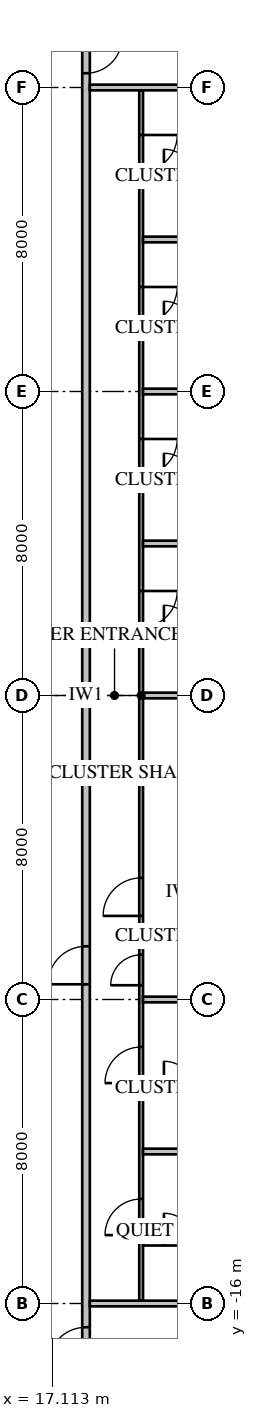
"""IFC4 building model, lengths in metres.
Left out: names, types, materials, properties, quantities, classifications, styles, units other than length and angle.
Written with IfcOpenShell. Run it as: python <this file> out.ifc"""

import sys

from ifc_helpers import new_model, si_unit, direction, frame, frame_2d, origin, place, context, subcontext, project, spatial, rectangle, extrude, element, fill, save


model = new_model("IFC4")
c1 = context("Model", 3, precision=1e-05, world=origin(), true_north=direction((0.0, 1.0)))
c2 = subcontext(c1, "Body", "Model", "MODEL_VIEW")
j1 = project(units=[si_unit("LENGTHUNIT", "METRE"), si_unit("PLANEANGLEUNIT", "RADIAN")], contexts=[c1])
p1 = place(None, origin())
s1 = spatial("IfcSite", under=j1, at=p1, CompositionType="ELEMENT")
p2 = place(p1, origin())
s2 = spatial("IfcBuilding", under=s1, at=p2, CompositionType="ELEMENT")
p3 = place(p2, frame((0.0, 0.0, 23.7)))
s3 = spatial("IfcBuildingStorey", under=s2, at=p3, CompositionType="ELEMENT", Elevation=23.7)
p4 = place(p3, frame((18.0, -18.0, 0.0), z_axis=(0.0, 0.0, 1.0), x_axis=(0.0, 1.0, 0.0)))
e1 = element("IfcWall", 1, at=p4, inside=s3, PredefinedType="PARTITIONING", context=c2, shape_type="SweptSolid", body=[
    extrude(rectangle(XDim=36.0, YDim=0.2, at=frame_2d((18.0, 0.0))), origin(), (0.0, 0.0, 1.0), 3.65),
])
p5 = place(p4, frame((10.4, 0.0, 0.0)))
e2 = element("IfcOpeningElement", 2, at=p5, cuts=e1, PredefinedType="OPENING", context=c2, shape_type="SweptSolid", body=[
    extrude(rectangle(XDim=1.0, YDim=2.1, at=frame_2d((0.5, 1.05))), frame((0.0, 0.12, 0.0), z_axis=(0.0, -1.0, 0.0), x_axis=(1.0, 0.0, 0.0)), (0.0, 0.0, 1.0), 0.24),
])
p6 = place(p4, frame((0.375, 0.0, 0.0)))
e3 = element("IfcOpeningElement", 3, at=p6, cuts=e1, PredefinedType="OPENING", context=c2, shape_type="SweptSolid", body=[
    extrude(rectangle(XDim=1.0, YDim=2.1, at=frame_2d((0.5, 1.05))), frame((0.0, 0.12, 0.0), z_axis=(0.0, -1.0, 0.0), x_axis=(1.0, 0.0, 0.0)), (0.0, 0.0, 1.0), 0.24),
])
p7 = place(p4, frame((34.375, 0.0, 0.0)))
e4 = element("IfcOpeningElement", 4, at=p7, cuts=e1, PredefinedType="OPENING", context=c2, shape_type="SweptSolid", body=[
    extrude(rectangle(XDim=0.95, YDim=2.1, at=frame_2d((0.475, 1.05))), frame((0.0, 0.12, 0.0), z_axis=(0.0, -1.0, 0.0), x_axis=(1.0, 0.0, 0.0)), (0.0, 0.0, 1.0), 0.24),
])
p8 = place(p3, frame((19.45, -15.925, 0.0), z_axis=(0.0, 0.0, 1.0), x_axis=(0.0, 1.0, 0.0)))
e5 = element("IfcWall", 5, at=p8, inside=s3, PredefinedType="PARTITIONING", context=c2, shape_type="SweptSolid", body=[
    extrude(rectangle(XDim=31.85, YDim=0.1, at=frame_2d((15.925, 0.0))), origin(), (0.0, 0.0, 1.0), 3.65),
])
p9 = place(p8, frame((10.125, 0.0, 0.0)))
e6 = element("IfcOpeningElement", 6, at=p9, cuts=e5, PredefinedType="OPENING", context=c2, shape_type="SweptSolid", body=[
    extrude(rectangle(XDim=1.0, YDim=2.1, at=frame_2d((0.5, 1.05))), frame((0.0, 0.07, 0.0), z_axis=(0.0, -1.0, 0.0), x_axis=(1.0, 0.0, 0.0)), (0.0, 0.0, 1.0), 0.14),
])
p10 = place(p8, frame((8.3, 0.0, 0.0)))
e7 = element("IfcOpeningElement", 7, at=p10, cuts=e5, PredefinedType="OPENING", context=c2, shape_type="SweptSolid", body=[
    extrude(rectangle(XDim=0.8, YDim=2.1, at=frame_2d((0.4, 1.05))), frame((0.0, 0.07, 0.0), z_axis=(0.0, -1.0, 0.0), x_axis=(1.0, 0.0, 0.0)), (0.0, 0.0, 1.0), 0.14),
])
p11 = place(p8, frame((1.725, 0.0, 0.0)))
e8 = element("IfcOpeningElement", 8, at=p11, cuts=e5, PredefinedType="OPENING", context=c2, shape_type="SweptSolid", body=[
    extrude(rectangle(XDim=0.95, YDim=2.1, at=frame_2d((0.475, 1.05))), frame((0.0, 0.07, 0.0), z_axis=(0.0, -1.0, 0.0), x_axis=(1.0, 0.0, 0.0)), (0.0, 0.0, 1.0), 0.14),
])
p12 = place(p8, frame((5.725, 0.0, 0.0)))
e9 = element("IfcOpeningElement", 9, at=p12, cuts=e5, PredefinedType="OPENING", context=c2, shape_type="SweptSolid", body=[
    extrude(rectangle(XDim=0.95, YDim=2.1, at=frame_2d((0.475, 1.05))), frame((0.0, 0.07, 0.0), z_axis=(0.0, -1.0, 0.0), x_axis=(1.0, 0.0, 0.0)), (0.0, 0.0, 1.0), 0.14),
])
p13 = place(p8, frame((17.725, 0.0, 0.0)))
e10 = element("IfcOpeningElement", 10, at=p13, cuts=e5, PredefinedType="OPENING", context=c2, shape_type="SweptSolid", body=[
    extrude(rectangle(XDim=0.95, YDim=2.1, at=frame_2d((0.475, 1.05))), frame((0.0, 0.07, 0.0), z_axis=(0.0, -1.0, 0.0), x_axis=(1.0, 0.0, 0.0)), (0.0, 0.0, 1.0), 0.14),
])
p14 = place(p8, frame((21.725, 0.0, 0.0)))
e11 = element("IfcOpeningElement", 11, at=p14, cuts=e5, PredefinedType="OPENING", context=c2, shape_type="SweptSolid", body=[
    extrude(rectangle(XDim=0.95, YDim=2.1, at=frame_2d((0.475, 1.05))), frame((0.0, 0.07, 0.0), z_axis=(0.0, -1.0, 0.0), x_axis=(1.0, 0.0, 0.0)), (0.0, 0.0, 1.0), 0.14),
])
p15 = place(p8, frame((25.725, 0.0, 0.0)))
e12 = element("IfcOpeningElement", 12, at=p15, cuts=e5, PredefinedType="OPENING", context=c2, shape_type="SweptSolid", body=[
    extrude(rectangle(XDim=0.95, YDim=2.1, at=frame_2d((0.475, 1.05))), frame((0.0, 0.07, 0.0), z_axis=(0.0, -1.0, 0.0), x_axis=(1.0, 0.0, 0.0)), (0.0, 0.0, 1.0), 0.14),
])
p16 = place(p8, frame((29.725, 0.0, 0.0)))
e13 = element("IfcOpeningElement", 13, at=p16, cuts=e5, PredefinedType="OPENING", context=c2, shape_type="SweptSolid", body=[
    extrude(rectangle(XDim=0.95, YDim=2.1, at=frame_2d((0.475, 1.05))), frame((0.0, 0.07, 0.0), z_axis=(0.0, -1.0, 0.0), x_axis=(1.0, 0.0, 0.0)), (0.0, 0.0, 1.0), 0.14),
])
p17 = place(p3, frame((19.5, -6.275, 0.0), z_axis=(0.0, 0.0, 1.0), x_axis=(1.0, 0.0, 0.0)))
e14 = element("IfcWall", 14, at=p17, inside=s3, PredefinedType="PARTITIONING", context=c2, shape_type="SweptSolid", body=[
    extrude(rectangle(XDim=2.1, YDim=0.1, at=frame_2d((1.05, 0.0))), origin(), (0.0, 0.0, 1.0), 3.65),
])
p18 = place(p3, frame((18.1, -16.0, 0.0), z_axis=(0.0, 0.0, 1.0), x_axis=(1.0, 0.0, 0.0)))
e15 = element("IfcWall", 15, at=p18, inside=s3, PredefinedType="PARTITIONING", context=c2, shape_type="SweptSolid", body=[
    extrude(rectangle(XDim=6.589, YDim=0.15, at=frame_2d((3.295, 0.0))), origin(), (0.0, 0.0, 1.0), 3.65),
])
for number, where, z_axis, x_axis in (
    (16, (19.5, -12.0, 0.0), (0.0, 0.0, 1.0), (1.0, 0.0, 0.0)),
    (17, (19.5, -8.0, 0.0), (0.0, 0.0, 1.0), (1.0, 0.0, 0.0)),
):
    element("IfcWall", number, at=place(p3, frame(where, z_axis=z_axis, x_axis=x_axis)), inside=s3, PredefinedType="PARTITIONING", context=c2, shape_type="SweptSolid", body=[
        extrude(rectangle(XDim=5.2, YDim=0.15, at=frame_2d((2.6, 0.0))), origin(), (0.0, 0.0, 1.0), 3.65),
    ])
p19 = place(p3, frame((19.5, 0.0, 0.0), z_axis=(0.0, 0.0, 1.0), x_axis=(1.0, 0.0, 0.0)))
e18 = element("IfcWall", 18, at=p19, inside=s3, PredefinedType="PARTITIONING", context=c2, shape_type="SweptSolid", body=[
    extrude(rectangle(XDim=5.2, YDim=0.15, at=frame_2d((2.6, 0.0))), origin(), (0.0, 0.0, 1.0), 2.957),
])
for number, where, z_axis, x_axis in (
    (19, (19.5, 4.0, 0.0), (0.0, 0.0, 1.0), (1.0, 0.0, 0.0)),
    (20, (19.5, 8.0, 0.0), (0.0, 0.0, 1.0), (1.0, 0.0, 0.0)),
    (21, (19.5, 12.0, 0.0), (0.0, 0.0, 1.0), (1.0, 0.0, 0.0)),
):
    element("IfcWall", number, at=place(p3, frame(where, z_axis=z_axis, x_axis=x_axis)), inside=s3, PredefinedType="PARTITIONING", context=c2, shape_type="SweptSolid", body=[
        extrude(rectangle(XDim=5.2, YDim=0.15, at=frame_2d((2.6, 0.0))), origin(), (0.0, 0.0, 1.0), 3.65),
    ])
p20 = place(p3, frame((18.1, 16.0, 0.0), z_axis=(0.0, 0.0, 1.0), x_axis=(1.0, 0.0, 0.0)))
e22 = element("IfcWall", 22, at=p20, inside=s3, PredefinedType="PARTITIONING", context=c2, shape_type="SweptSolid", body=[
    extrude(rectangle(XDim=6.589, YDim=0.15, at=frame_2d((3.295, 0.0))), origin(), (0.0, 0.0, 1.0), 3.65),
])
p21 = place(p3, frame((19.5, -14.425, 0.0), z_axis=(0.0, 0.0, 1.0), x_axis=(1.0, 0.0, 0.0)))
e23 = element("IfcWall", 23, at=p21, inside=s3, PredefinedType="PARTITIONING", context=c2, shape_type="SweptSolid", body=[
    extrude(rectangle(XDim=2.7, YDim=0.1, at=frame_2d((1.35, 0.0))), origin(), (0.0, 0.0, 1.0), 3.65),
])
p22 = place(p21, frame((0.55, 0.0, 0.0)))
e24 = element("IfcOpeningElement", 24, at=p22, cuts=e23, PredefinedType="OPENING", context=c2, shape_type="SweptSolid", body=[
    extrude(rectangle(XDim=0.8, YDim=2.1, at=frame_2d((0.4, 1.05))), frame((0.0, 0.07, 0.0), z_axis=(0.0, -1.0, 0.0), x_axis=(1.0, 0.0, 0.0)), (0.0, 0.0, 1.0), 0.14),
])
p23 = place(p3, frame((19.5, -10.425, 0.0), z_axis=(0.0, 0.0, 1.0), x_axis=(1.0, 0.0, 0.0)))
e25 = element("IfcWall", 25, at=p23, inside=s3, PredefinedType="PARTITIONING", context=c2, shape_type="SweptSolid", body=[
    extrude(rectangle(XDim=2.7, YDim=0.1, at=frame_2d((1.35, 0.0))), origin(), (0.0, 0.0, 1.0), 3.65),
])
p24 = place(p23, frame((0.55, 0.0, 0.0)))
e26 = element("IfcOpeningElement", 26, at=p24, cuts=e25, PredefinedType="OPENING", context=c2, shape_type="SweptSolid", body=[
    extrude(rectangle(XDim=0.8, YDim=2.1, at=frame_2d((0.4, 1.05))), frame((0.0, 0.07, 0.0), z_axis=(0.0, -1.0, 0.0), x_axis=(1.0, 0.0, 0.0)), (0.0, 0.0, 1.0), 0.14),
])
p25 = place(p3, frame((19.5, 1.575, 0.0), z_axis=(0.0, 0.0, 1.0), x_axis=(1.0, 0.0, 0.0)))
e27 = element("IfcWall", 27, at=p25, inside=s3, PredefinedType="PARTITIONING", context=c2, shape_type="SweptSolid", body=[
    extrude(rectangle(XDim=2.7, YDim=0.1, at=frame_2d((1.35, 0.0))), origin(), (0.0, 0.0, 1.0), 3.65),
])
p26 = place(p25, frame((0.55, 0.0, 0.0)))
e28 = element("IfcOpeningElement", 28, at=p26, cuts=e27, PredefinedType="OPENING", context=c2, shape_type="SweptSolid", body=[
    extrude(rectangle(XDim=0.8, YDim=2.1, at=frame_2d((0.4, 1.05))), frame((0.0, 0.07, 0.0), z_axis=(0.0, -1.0, 0.0), x_axis=(1.0, 0.0, 0.0)), (0.0, 0.0, 1.0), 0.14),
])
p27 = place(p3, frame((19.5, 5.575, 0.0), z_axis=(0.0, 0.0, 1.0), x_axis=(1.0, 0.0, 0.0)))
e29 = element("IfcWall", 29, at=p27, inside=s3, PredefinedType="PARTITIONING", context=c2, shape_type="SweptSolid", body=[
    extrude(rectangle(XDim=2.7, YDim=0.1, at=frame_2d((1.35, 0.0))), origin(), (0.0, 0.0, 1.0), 3.65),
])
p28 = place(p27, frame((0.55, 0.0, 0.0)))
e30 = element("IfcOpeningElement", 30, at=p28, cuts=e29, PredefinedType="OPENING", context=c2, shape_type="SweptSolid", body=[
    extrude(rectangle(XDim=0.8, YDim=2.1, at=frame_2d((0.4, 1.05))), frame((0.0, 0.07, 0.0), z_axis=(0.0, -1.0, 0.0), x_axis=(1.0, 0.0, 0.0)), (0.0, 0.0, 1.0), 0.14),
])
p29 = place(p3, frame((19.5, 9.575, 0.0), z_axis=(0.0, 0.0, 1.0), x_axis=(1.0, 0.0, 0.0)))
e31 = element("IfcWall", 31, at=p29, inside=s3, PredefinedType="PARTITIONING", context=c2, shape_type="SweptSolid", body=[
    extrude(rectangle(XDim=2.7, YDim=0.1, at=frame_2d((1.35, 0.0))), origin(), (0.0, 0.0, 1.0), 3.65),
])
p30 = place(p29, frame((0.55, 0.0, 0.0)))
e32 = element("IfcOpeningElement", 32, at=p30, cuts=e31, PredefinedType="OPENING", context=c2, shape_type="SweptSolid", body=[
    extrude(rectangle(XDim=0.8, YDim=2.1, at=frame_2d((0.4, 1.05))), frame((0.0, 0.07, 0.0), z_axis=(0.0, -1.0, 0.0), x_axis=(1.0, 0.0, 0.0)), (0.0, 0.0, 1.0), 0.14),
])
p31 = place(p3, frame((19.5, 13.575, 0.0), z_axis=(0.0, 0.0, 1.0), x_axis=(1.0, 0.0, 0.0)))
e33 = element("IfcWall", 33, at=p31, inside=s3, PredefinedType="PARTITIONING", context=c2, shape_type="SweptSolid", body=[
    extrude(rectangle(XDim=2.7, YDim=0.1, at=frame_2d((1.35, 0.0))), origin(), (0.0, 0.0, 1.0), 3.65),
])
p32 = place(p31, frame((0.55, 0.0, 0.0)))
e34 = element("IfcOpeningElement", 34, at=p32, cuts=e33, PredefinedType="OPENING", context=c2, shape_type="SweptSolid", body=[
    extrude(rectangle(XDim=0.8, YDim=2.1, at=frame_2d((0.4, 1.05))), frame((0.0, 0.07, 0.0), z_axis=(0.0, -1.0, 0.0), x_axis=(1.0, 0.0, 0.0)), (0.0, 0.0, 1.0), 0.14),
])
p33 = place(p5, origin())
e35 = element("IfcDoor", 35, at=p33, inside=s3, OperationType="SINGLE_SWING_LEFT", PredefinedType="DOOR", context=c2, shape_type="SweptSolid", body=[
    extrude(rectangle(XDim=1.0, YDim=2.1, at=frame_2d((0.5, 1.05))), frame((0.0, 0.025, 0.0), z_axis=(0.0, -1.0, 0.0), x_axis=(1.0, 0.0, 0.0)), (0.0, 0.0, 1.0), 0.05),
])
fill(e2, e35)
p34 = place(p9, origin())
e36 = element("IfcDoor", 36, at=p34, inside=s3, OperationType="SINGLE_SWING_LEFT", PredefinedType="DOOR", context=c2, shape_type="SweptSolid", body=[
    extrude(rectangle(XDim=1.0, YDim=2.1, at=frame_2d((0.5, 1.05))), frame((0.0, 0.025, 0.0), z_axis=(0.0, -1.0, 0.0), x_axis=(1.0, 0.0, 0.0)), (0.0, 0.0, 1.0), 0.05),
])
fill(e6, e36)
p35 = place(p10, origin())
e37 = element("IfcDoor", 37, at=p35, inside=s3, OperationType="SINGLE_SWING_LEFT", PredefinedType="DOOR", context=c2, shape_type="SweptSolid", body=[
    extrude(rectangle(XDim=0.8, YDim=2.1, at=frame_2d((0.4, 1.05))), frame((0.0, 0.025, 0.0), z_axis=(0.0, -1.0, 0.0), x_axis=(1.0, 0.0, 0.0)), (0.0, 0.0, 1.0), 0.05),
])
fill(e7, e37)
p36 = place(p6, origin())
e38 = element("IfcDoor", 38, at=p36, inside=s3, OperationType="SINGLE_SWING_LEFT", PredefinedType="DOOR", context=c2, shape_type="SweptSolid", body=[
    extrude(rectangle(XDim=1.0, YDim=2.1, at=frame_2d((0.5, 1.05))), frame((0.0, 0.025, 0.0), z_axis=(0.0, -1.0, 0.0), x_axis=(1.0, 0.0, 0.0)), (0.0, 0.0, 1.0), 0.05),
])
fill(e3, e38)
p37 = place(p11, origin())
e39 = element("IfcDoor", 39, at=p37, inside=s3, OperationType="SINGLE_SWING_LEFT", PredefinedType="DOOR", context=c2, shape_type="SweptSolid", body=[
    extrude(rectangle(XDim=0.95, YDim=2.1, at=frame_2d((0.475, 1.05))), frame((0.0, 0.025, 0.0), z_axis=(0.0, -1.0, 0.0), x_axis=(1.0, 0.0, 0.0)), (0.0, 0.0, 1.0), 0.05),
])
fill(e8, e39)
p38 = place(p22, origin())
e40 = element("IfcDoor", 40, at=p38, inside=s3, OperationType="SINGLE_SWING_LEFT", PredefinedType="DOOR", context=c2, shape_type="SweptSolid", body=[
    extrude(rectangle(XDim=0.8, YDim=2.1, at=frame_2d((0.4, 1.05))), frame((0.0, 0.025, 0.0), z_axis=(0.0, -1.0, 0.0), x_axis=(1.0, 0.0, 0.0)), (0.0, 0.0, 1.0), 0.05),
])
fill(e24, e40)
p39 = place(p12, origin())
e41 = element("IfcDoor", 41, at=p39, inside=s3, OperationType="SINGLE_SWING_LEFT", PredefinedType="DOOR", context=c2, shape_type="SweptSolid", body=[
    extrude(rectangle(XDim=0.95, YDim=2.1, at=frame_2d((0.475, 1.05))), frame((0.0, 0.025, 0.0), z_axis=(0.0, -1.0, 0.0), x_axis=(1.0, 0.0, 0.0)), (0.0, 0.0, 1.0), 0.05),
])
fill(e9, e41)
p40 = place(p24, origin())
e42 = element("IfcDoor", 42, at=p40, inside=s3, OperationType="SINGLE_SWING_LEFT", PredefinedType="DOOR", context=c2, shape_type="SweptSolid", body=[
    extrude(rectangle(XDim=0.8, YDim=2.1, at=frame_2d((0.4, 1.05))), frame((0.0, 0.025, 0.0), z_axis=(0.0, -1.0, 0.0), x_axis=(1.0, 0.0, 0.0)), (0.0, 0.0, 1.0), 0.05),
])
fill(e26, e42)
p41 = place(p13, origin())
e43 = element("IfcDoor", 43, at=p41, inside=s3, OperationType="SINGLE_SWING_RIGHT", PredefinedType="DOOR", context=c2, shape_type="SweptSolid", body=[
    extrude(rectangle(XDim=0.95, YDim=2.1, at=frame_2d((0.475, 1.05))), frame((0.0, 0.025, 0.0), z_axis=(0.0, -1.0, 0.0), x_axis=(1.0, 0.0, 0.0)), (0.0, 0.0, 1.0), 0.05),
])
fill(e10, e43)
p42 = place(p26, origin())
e44 = element("IfcDoor", 44, at=p42, inside=s3, OperationType="SINGLE_SWING_LEFT", PredefinedType="DOOR", context=c2, shape_type="SweptSolid", body=[
    extrude(rectangle(XDim=0.8, YDim=2.1, at=frame_2d((0.4, 1.05))), frame((0.0, 0.025, 0.0), z_axis=(0.0, -1.0, 0.0), x_axis=(1.0, 0.0, 0.0)), (0.0, 0.0, 1.0), 0.05),
])
fill(e28, e44)
p43 = place(p14, origin())
e45 = element("IfcDoor", 45, at=p43, inside=s3, OperationType="SINGLE_SWING_RIGHT", PredefinedType="DOOR", context=c2, shape_type="SweptSolid", body=[
    extrude(rectangle(XDim=0.95, YDim=2.1, at=frame_2d((0.475, 1.05))), frame((0.0, 0.025, 0.0), z_axis=(0.0, -1.0, 0.0), x_axis=(1.0, 0.0, 0.0)), (0.0, 0.0, 1.0), 0.05),
])
fill(e11, e45)
p44 = place(p28, origin())
e46 = element("IfcDoor", 46, at=p44, inside=s3, OperationType="SINGLE_SWING_LEFT", PredefinedType="DOOR", context=c2, shape_type="SweptSolid", body=[
    extrude(rectangle(XDim=0.8, YDim=2.1, at=frame_2d((0.4, 1.05))), frame((0.0, 0.025, 0.0), z_axis=(0.0, -1.0, 0.0), x_axis=(1.0, 0.0, 0.0)), (0.0, 0.0, 1.0), 0.05),
])
fill(e30, e46)
p45 = place(p15, origin())
e47 = element("IfcDoor", 47, at=p45, inside=s3, OperationType="SINGLE_SWING_RIGHT", PredefinedType="DOOR", context=c2, shape_type="SweptSolid", body=[
    extrude(rectangle(XDim=0.95, YDim=2.1, at=frame_2d((0.475, 1.05))), frame((0.0, 0.025, 0.0), z_axis=(0.0, -1.0, 0.0), x_axis=(1.0, 0.0, 0.0)), (0.0, 0.0, 1.0), 0.05),
])
fill(e12, e47)
p46 = place(p30, origin())
e48 = element("IfcDoor", 48, at=p46, inside=s3, OperationType="SINGLE_SWING_LEFT", PredefinedType="DOOR", context=c2, shape_type="SweptSolid", body=[
    extrude(rectangle(XDim=0.8, YDim=2.1, at=frame_2d((0.4, 1.05))), frame((0.0, 0.025, 0.0), z_axis=(0.0, -1.0, 0.0), x_axis=(1.0, 0.0, 0.0)), (0.0, 0.0, 1.0), 0.05),
])
fill(e32, e48)
p47 = place(p16, origin())
e49 = element("IfcDoor", 49, at=p47, inside=s3, OperationType="SINGLE_SWING_RIGHT", PredefinedType="DOOR", context=c2, shape_type="SweptSolid", body=[
    extrude(rectangle(XDim=0.95, YDim=2.1, at=frame_2d((0.475, 1.05))), frame((0.0, 0.025, 0.0), z_axis=(0.0, -1.0, 0.0), x_axis=(1.0, 0.0, 0.0)), (0.0, 0.0, 1.0), 0.05),
])
fill(e13, e49)
p48 = place(p32, origin())
e50 = element("IfcDoor", 50, at=p48, inside=s3, OperationType="SINGLE_SWING_LEFT", PredefinedType="DOOR", context=c2, shape_type="SweptSolid", body=[
    extrude(rectangle(XDim=0.8, YDim=2.1, at=frame_2d((0.4, 1.05))), frame((0.0, 0.025, 0.0), z_axis=(0.0, -1.0, 0.0), x_axis=(1.0, 0.0, 0.0)), (0.0, 0.0, 1.0), 0.05),
])
fill(e34, e50)
p49 = place(p7, origin())
e51 = element("IfcDoor", 51, at=p49, inside=s3, OperationType="SINGLE_SWING_RIGHT", PredefinedType="DOOR", context=c2, shape_type="SweptSolid", body=[
    extrude(rectangle(XDim=0.95, YDim=2.1, at=frame_2d((0.475, 1.05))), frame((0.0, 0.025, 0.0), z_axis=(0.0, -1.0, 0.0), x_axis=(1.0, 0.0, 0.0)), (0.0, 0.0, 1.0), 0.05),
])
fill(e4, e51)
save(model, sys.argv[1])
